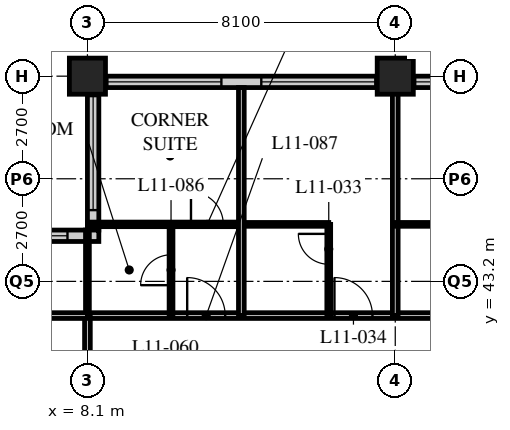
"""IFC4 building model, lengths in metres.
Left out: names, types, materials, properties, quantities, classifications, styles, units other than length and angle.
Written with IfcOpenShell. Run it as: python <this file> out.ifc"""

import sys

from ifc_helpers import new_model, si_unit, direction, frame, frame_2d, origin, origin_2d, place, context, subcontext, project, spatial, rectangle, hollow_rectangle, extrude, element, fill, save


model = new_model("IFC4")
c1 = context("Model", 3, precision=1e-05, world=origin(), true_north=direction((0.0, 1.0)))
c2 = subcontext(c1, "Body", "Model", "MODEL_VIEW")
j1 = project(units=[si_unit("LENGTHUNIT", "METRE"), si_unit("PLANEANGLEUNIT", "RADIAN")], contexts=[c1])
p1 = place(None, origin())
s1 = spatial("IfcSite", under=j1, at=p1, CompositionType="ELEMENT")
p2 = place(p1, origin())
s2 = spatial("IfcBuilding", under=s1, at=p2, CompositionType="ELEMENT")
p3 = place(p2, frame((0.0, 0.0, 50.0)))
s3 = spatial("IfcBuildingStorey", under=s2, at=p3, CompositionType="ELEMENT", Elevation=50.0)
for number, where, z_axis, x_axis in (
    (1, (8.1, 48.6, 0.0), (0.0, 0.0, 1.0), (1.0, 0.0, 0.0)),
    (2, (16.2, 48.6, 0.0), (0.0, 0.0, 1.0), (1.0, 0.0, 0.0)),
):
    element("IfcColumn", number, at=place(p3, frame(where, z_axis=z_axis, x_axis=x_axis)), inside=s3, PredefinedType="COLUMN", context=c2, shape_type="SweptSolid", body=[
        extrude(hollow_rectangle(XDim=0.95, YDim=0.95, WallThickness=0.095, at=origin_2d()), origin(), (0.0, 0.0, 1.0), 3.4),
    ])
p4 = place(p3, frame((48.3, 48.45, 0.0), z_axis=(0.0, 0.0, 1.0), x_axis=(-1.0, 0.0, 0.0)))
e3 = element("IfcWall", 3, at=p4, inside=s3, PredefinedType="SOLIDWALL", context=c2, shape_type="SweptSolid", body=[
    extrude(rectangle(XDim=40.2, YDim=0.3, at=frame_2d((20.1, 0.0))), origin(), (0.0, 0.0, 1.0), 3.19),
])
p5 = place(p4, frame((0.225, 0.0, 0.9)))
e4 = element("IfcOpeningElement", 4, at=p5, cuts=e3, PredefinedType="OPENING", context=c2, shape_type="SweptSolid", body=[
    extrude(rectangle(XDim=3.0, YDim=2.0, at=frame_2d((1.5, 1.0))), frame((0.0, 0.16, 0.0), z_axis=(0.0, -1.0, 0.0), x_axis=(1.0, 0.0, 0.0)), (0.0, 0.0, 1.0), 0.32),
])
p6 = place(p4, frame((4.275, 0.0, 0.9)))
e5 = element("IfcOpeningElement", 5, at=p6, cuts=e3, PredefinedType="OPENING", context=c2, shape_type="SweptSolid", body=[
    extrude(rectangle(XDim=3.0, YDim=2.0, at=frame_2d((1.5, 1.0))), frame((0.0, 0.16, 0.0), z_axis=(0.0, -1.0, 0.0), x_axis=(1.0, 0.0, 0.0)), (0.0, 0.0, 1.0), 0.32),
])
p7 = place(p4, frame((8.325, 0.0, 0.9)))
e6 = element("IfcOpeningElement", 6, at=p7, cuts=e3, PredefinedType="OPENING", context=c2, shape_type="SweptSolid", body=[
    extrude(rectangle(XDim=3.0, YDim=2.0, at=frame_2d((1.5, 1.0))), frame((0.0, 0.16, 0.0), z_axis=(0.0, -1.0, 0.0), x_axis=(1.0, 0.0, 0.0)), (0.0, 0.0, 1.0), 0.32),
])
p8 = place(p4, frame((12.375, 0.0, 0.9)))
e7 = element("IfcOpeningElement", 7, at=p8, cuts=e3, PredefinedType="OPENING", context=c2, shape_type="SweptSolid", body=[
    extrude(rectangle(XDim=3.0, YDim=2.0, at=frame_2d((1.5, 1.0))), frame((0.0, 0.16, 0.0), z_axis=(0.0, -1.0, 0.0), x_axis=(1.0, 0.0, 0.0)), (0.0, 0.0, 1.0), 0.32),
])
p9 = place(p4, frame((16.425, 0.0, 0.9)))
e8 = element("IfcOpeningElement", 8, at=p9, cuts=e3, PredefinedType="OPENING", context=c2, shape_type="SweptSolid", body=[
    extrude(rectangle(XDim=3.0, YDim=2.0, at=frame_2d((1.5, 1.0))), frame((0.0, 0.16, 0.0), z_axis=(0.0, -1.0, 0.0), x_axis=(1.0, 0.0, 0.0)), (0.0, 0.0, 1.0), 0.32),
])
p10 = place(p4, frame((20.475, 0.0, 0.9)))
e9 = element("IfcOpeningElement", 9, at=p10, cuts=e3, PredefinedType="OPENING", context=c2, shape_type="SweptSolid", body=[
    extrude(rectangle(XDim=3.0, YDim=2.0, at=frame_2d((1.5, 1.0))), frame((0.0, 0.16, 0.0), z_axis=(0.0, -1.0, 0.0), x_axis=(1.0, 0.0, 0.0)), (0.0, 0.0, 1.0), 0.32),
])
p11 = place(p4, frame((24.525, 0.0, 0.9)))
e10 = element("IfcOpeningElement", 10, at=p11, cuts=e3, PredefinedType="OPENING", context=c2, shape_type="SweptSolid", body=[
    extrude(rectangle(XDim=3.0, YDim=2.0, at=frame_2d((1.5, 1.0))), frame((0.0, 0.16, 0.0), z_axis=(0.0, -1.0, 0.0), x_axis=(1.0, 0.0, 0.0)), (0.0, 0.0, 1.0), 0.32),
])
p12 = place(p4, frame((28.575, 0.0, 0.9)))
e11 = element("IfcOpeningElement", 11, at=p12, cuts=e3, PredefinedType="OPENING", context=c2, shape_type="SweptSolid", body=[
    extrude(rectangle(XDim=3.0, YDim=2.0, at=frame_2d((1.5, 1.0))), frame((0.0, 0.16, 0.0), z_axis=(0.0, -1.0, 0.0), x_axis=(1.0, 0.0, 0.0)), (0.0, 0.0, 1.0), 0.32),
])
p13 = place(p4, frame((32.625, 0.0, 0.9)))
e12 = element("IfcOpeningElement", 12, at=p13, cuts=e3, PredefinedType="OPENING", context=c2, shape_type="SweptSolid", body=[
    extrude(rectangle(XDim=3.0, YDim=2.0, at=frame_2d((1.5, 1.0))), frame((0.0, 0.16, 0.0), z_axis=(0.0, -1.0, 0.0), x_axis=(1.0, 0.0, 0.0)), (0.0, 0.0, 1.0), 0.32),
])
p14 = place(p4, frame((36.675, 0.0, 0.9)))
e13 = element("IfcOpeningElement", 13, at=p14, cuts=e3, PredefinedType="OPENING", context=c2, shape_type="SweptSolid", body=[
    extrude(rectangle(XDim=3.0, YDim=2.0, at=frame_2d((1.5, 1.0))), frame((0.0, 0.16, 0.0), z_axis=(0.0, -1.0, 0.0), x_axis=(1.0, 0.0, 0.0)), (0.0, 0.0, 1.0), 0.32),
])
p15 = place(p3, frame((8.25, 48.3, 0.0), z_axis=(0.0, 0.0, 1.0), x_axis=(0.0, -1.0, 0.0)))
e14 = element("IfcWall", 14, at=p15, inside=s3, PredefinedType="SOLIDWALL", context=c2, shape_type="SweptSolid", body=[
    extrude(rectangle(XDim=3.75, YDim=0.3, at=frame_2d((1.875, 0.0))), origin(), (0.0, 0.0, 1.0), 3.19),
])
p16 = place(p15, frame((0.225, 0.0, 0.9)))
e15 = element("IfcOpeningElement", 15, at=p16, cuts=e14, PredefinedType="OPENING", context=c2, shape_type="SweptSolid", body=[
    extrude(rectangle(XDim=3.0, YDim=1.5, at=frame_2d((1.5, 0.75))), frame((0.0, 0.16, 0.0), z_axis=(0.0, -1.0, 0.0), x_axis=(1.0, 0.0, 0.0)), (0.0, 0.0, 1.0), 0.32),
])
p17 = place(p3, frame((8.4, 44.4, 0.0), z_axis=(0.0, 0.0, 1.0), x_axis=(-1.0, 0.0, 0.0)))
e16 = element("IfcWall", 16, at=p17, inside=s3, PredefinedType="SOLIDWALL", context=c2, shape_type="SweptSolid", body=[
    extrude(rectangle(XDim=4.35, YDim=0.3, at=frame_2d((2.175, 0.0))), origin(), (0.0, 0.0, 1.0), 3.19),
])
p18 = place(p17, frame((0.825, 0.0, 0.9)))
e17 = element("IfcOpeningElement", 17, at=p18, cuts=e16, PredefinedType="OPENING", context=c2, shape_type="SweptSolid", body=[
    extrude(rectangle(XDim=3.0, YDim=1.5, at=frame_2d((1.5, 0.75))), frame((0.0, 0.16, 0.0), z_axis=(0.0, -1.0, 0.0), x_axis=(1.0, 0.0, 0.0)), (0.0, 0.0, 1.0), 0.32),
])
p19 = place(p3, frame((8.1, 42.3, 0.0), z_axis=(0.0, 0.0, 1.0), x_axis=(1.0, 0.0, 0.0)))
e18 = element("IfcWall", 18, at=p19, inside=s3, PredefinedType="PARTITIONING", context=c2, shape_type="SweptSolid", body=[
    extrude(rectangle(XDim=40.5, YDim=0.15, at=frame_2d((20.25, 0.0))), origin(), (0.0, 0.0, 1.0), 3.19),
])
p20 = place(p19, frame((6.5, 0.0, 0.0)))
e19 = element("IfcOpeningElement", 19, at=p20, cuts=e18, PredefinedType="OPENING", context=c2, shape_type="SweptSolid", body=[
    extrude(rectangle(XDim=1.0, YDim=2.1, at=frame_2d((0.5, 1.05))), frame((0.0, 0.085, 0.0), z_axis=(0.0, -1.0, 0.0), x_axis=(1.0, 0.0, 0.0)), (0.0, 0.0, 1.0), 0.17),
])
p21 = place(p19, frame((10.55, 0.0, 0.0)))
e20 = element("IfcOpeningElement", 20, at=p21, cuts=e18, PredefinedType="OPENING", context=c2, shape_type="SweptSolid", body=[
    extrude(rectangle(XDim=1.0, YDim=2.1, at=frame_2d((0.5, 1.05))), frame((0.0, 0.085, 0.0), z_axis=(0.0, -1.0, 0.0), x_axis=(1.0, 0.0, 0.0)), (0.0, 0.0, 1.0), 0.17),
])
p22 = place(p19, frame((14.6, 0.0, 0.0)))
e21 = element("IfcOpeningElement", 21, at=p22, cuts=e18, PredefinedType="OPENING", context=c2, shape_type="SweptSolid", body=[
    extrude(rectangle(XDim=1.0, YDim=2.1, at=frame_2d((0.5, 1.05))), frame((0.0, 0.085, 0.0), z_axis=(0.0, -1.0, 0.0), x_axis=(1.0, 0.0, 0.0)), (0.0, 0.0, 1.0), 0.17),
])
p23 = place(p19, frame((18.65, 0.0, 0.0)))
e22 = element("IfcOpeningElement", 22, at=p23, cuts=e18, PredefinedType="OPENING", context=c2, shape_type="SweptSolid", body=[
    extrude(rectangle(XDim=1.0, YDim=2.1, at=frame_2d((0.5, 1.05))), frame((0.0, 0.085, 0.0), z_axis=(0.0, -1.0, 0.0), x_axis=(1.0, 0.0, 0.0)), (0.0, 0.0, 1.0), 0.17),
])
p24 = place(p19, frame((22.7, 0.0, 0.0)))
e23 = element("IfcOpeningElement", 23, at=p24, cuts=e18, PredefinedType="OPENING", context=c2, shape_type="SweptSolid", body=[
    extrude(rectangle(XDim=1.0, YDim=2.1, at=frame_2d((0.5, 1.05))), frame((0.0, 0.085, 0.0), z_axis=(0.0, -1.0, 0.0), x_axis=(1.0, 0.0, 0.0)), (0.0, 0.0, 1.0), 0.17),
])
p25 = place(p19, frame((26.75, 0.0, 0.0)))
e24 = element("IfcOpeningElement", 24, at=p25, cuts=e18, PredefinedType="OPENING", context=c2, shape_type="SweptSolid", body=[
    extrude(rectangle(XDim=1.0, YDim=2.1, at=frame_2d((0.5, 1.05))), frame((0.0, 0.085, 0.0), z_axis=(0.0, -1.0, 0.0), x_axis=(1.0, 0.0, 0.0)), (0.0, 0.0, 1.0), 0.17),
])
p26 = place(p19, frame((30.8, 0.0, 0.0)))
e25 = element("IfcOpeningElement", 25, at=p26, cuts=e18, PredefinedType="OPENING", context=c2, shape_type="SweptSolid", body=[
    extrude(rectangle(XDim=1.0, YDim=2.1, at=frame_2d((0.5, 1.05))), frame((0.0, 0.085, 0.0), z_axis=(0.0, -1.0, 0.0), x_axis=(1.0, 0.0, 0.0)), (0.0, 0.0, 1.0), 0.17),
])
p27 = place(p19, frame((34.85, 0.0, 0.0)))
e26 = element("IfcOpeningElement", 26, at=p27, cuts=e18, PredefinedType="OPENING", context=c2, shape_type="SweptSolid", body=[
    extrude(rectangle(XDim=1.0, YDim=2.1, at=frame_2d((0.5, 1.05))), frame((0.0, 0.085, 0.0), z_axis=(0.0, -1.0, 0.0), x_axis=(1.0, 0.0, 0.0)), (0.0, 0.0, 1.0), 0.17),
])
p28 = place(p19, frame((36.875, 0.0, 0.0)))
e27 = element("IfcOpeningElement", 27, at=p28, cuts=e18, PredefinedType="OPENING", context=c2, shape_type="SweptSolid", body=[
    extrude(rectangle(XDim=1.0, YDim=2.1, at=frame_2d((0.5, 1.05))), frame((0.0, 0.085, 0.0), z_axis=(0.0, -1.0, 0.0), x_axis=(1.0, 0.0, 0.0)), (0.0, 0.0, 1.0), 0.17),
])
p29 = place(p19, frame((2.625, 0.0, 0.0)))
e28 = element("IfcOpeningElement", 28, at=p29, cuts=e18, PredefinedType="OPENING", context=c2, shape_type="SweptSolid", body=[
    extrude(rectangle(XDim=1.0, YDim=2.1, at=frame_2d((0.5, 1.05))), frame((0.0, 0.085, 0.0), z_axis=(0.0, -1.0, 0.0), x_axis=(1.0, 0.0, 0.0)), (0.0, 0.0, 1.0), 0.17),
])
p30 = place(p3, frame((8.1, 16.2, 0.0), z_axis=(0.0, 0.0, 1.0), x_axis=(0.0, 1.0, 0.0)))
e29 = element("IfcWall", 29, at=p30, inside=s3, PredefinedType="PARTITIONING", context=c2, shape_type="SweptSolid", body=[
    extrude(rectangle(XDim=26.1, YDim=0.15, at=frame_2d((13.05, 0.0))), origin(), (0.0, 0.0, 1.0), 2.578),
])
p31 = place(p30, frame((2.75, 0.0, 0.0)))
e30 = element("IfcOpeningElement", 30, at=p31, cuts=e29, PredefinedType="OPENING", context=c2, shape_type="SweptSolid", body=[
    extrude(rectangle(XDim=1.0, YDim=2.1, at=frame_2d((0.5, 1.05))), frame((0.0, 0.085, 0.0), z_axis=(0.0, -1.0, 0.0), x_axis=(1.0, 0.0, 0.0)), (0.0, 0.0, 1.0), 0.17),
])
p32 = place(p30, frame((4.35, 0.0, 0.0)))
e31 = element("IfcOpeningElement", 31, at=p32, cuts=e29, PredefinedType="OPENING", context=c2, shape_type="SweptSolid", body=[
    extrude(rectangle(XDim=1.0, YDim=2.1, at=frame_2d((0.5, 1.05))), frame((0.0, 0.085, 0.0), z_axis=(0.0, -1.0, 0.0), x_axis=(1.0, 0.0, 0.0)), (0.0, 0.0, 1.0), 0.17),
])
p33 = place(p30, frame((10.85, 0.0, 0.0)))
e32 = element("IfcOpeningElement", 32, at=p33, cuts=e29, PredefinedType="OPENING", context=c2, shape_type="SweptSolid", body=[
    extrude(rectangle(XDim=1.0, YDim=2.1, at=frame_2d((0.5, 1.05))), frame((0.0, 0.085, 0.0), z_axis=(0.0, -1.0, 0.0), x_axis=(1.0, 0.0, 0.0)), (0.0, 0.0, 1.0), 0.17),
])
p34 = place(p30, frame((12.45, 0.0, 0.0)))
e33 = element("IfcOpeningElement", 33, at=p34, cuts=e29, PredefinedType="OPENING", context=c2, shape_type="SweptSolid", body=[
    extrude(rectangle(XDim=1.0, YDim=2.1, at=frame_2d((0.5, 1.05))), frame((0.0, 0.085, 0.0), z_axis=(0.0, -1.0, 0.0), x_axis=(1.0, 0.0, 0.0)), (0.0, 0.0, 1.0), 0.17),
])
p35 = place(p30, frame((18.65, 0.0, 0.0)))
e34 = element("IfcOpeningElement", 34, at=p35, cuts=e29, PredefinedType="OPENING", context=c2, shape_type="SweptSolid", body=[
    extrude(rectangle(XDim=1.0, YDim=2.1, at=frame_2d((0.5, 1.05))), frame((0.0, 0.085, 0.0), z_axis=(0.0, -1.0, 0.0), x_axis=(1.0, 0.0, 0.0)), (0.0, 0.0, 1.0), 0.17),
])
p36 = place(p30, frame((22.7, 0.0, 0.0)))
e35 = element("IfcOpeningElement", 35, at=p36, cuts=e29, PredefinedType="OPENING", context=c2, shape_type="SweptSolid", body=[
    extrude(rectangle(XDim=1.0, YDim=2.1, at=frame_2d((0.5, 1.05))), frame((0.0, 0.085, 0.0), z_axis=(0.0, -1.0, 0.0), x_axis=(1.0, 0.0, 0.0)), (0.0, 0.0, 1.0), 0.17),
])
p37 = place(p3, frame((12.15, 44.7, 0.0), z_axis=(0.0, 0.0, 1.0), x_axis=(1.0, 0.0, 0.0)))
e36 = element("IfcWall", 36, at=p37, inside=s3, PredefinedType="PARTITIONING", context=c2, shape_type="SweptSolid", body=[
    extrude(rectangle(XDim=2.3, YDim=0.1, at=frame_2d((1.15, 0.0))), origin(), (0.0, 0.0, 1.0), 3.19),
])
p38 = place(p3, frame((14.45, 42.3, 0.0), z_axis=(0.0, 0.0, 1.0), x_axis=(0.0, 1.0, 0.0)))
e37 = element("IfcWall", 37, at=p38, inside=s3, PredefinedType="PARTITIONING", context=c2, shape_type="SweptSolid", body=[
    extrude(rectangle(XDim=2.4, YDim=0.1, at=frame_2d((1.2, 0.0))), origin(), (0.0, 0.0, 1.0), 3.19),
])
p39 = place(p38, frame((1.35, 0.0, 0.0)))
e38 = element("IfcOpeningElement", 38, at=p39, cuts=e37, PredefinedType="OPENING", context=c2, shape_type="SweptSolid", body=[
    extrude(rectangle(XDim=0.8, YDim=2.1, at=frame_2d((0.4, 1.05))), frame((0.0, 0.06, 0.0), z_axis=(0.0, -1.0, 0.0), x_axis=(1.0, 0.0, 0.0)), (0.0, 0.0, 1.0), 0.12),
])
p40 = place(p3, frame((16.2, 42.3, 0.0), z_axis=(0.0, 0.0, 1.0), x_axis=(0.0, 1.0, 0.0)))
e39 = element("IfcWall", 39, at=p40, inside=s3, PredefinedType="PARTITIONING", context=c2, shape_type="SweptSolid", body=[
    extrude(rectangle(XDim=6.0, YDim=0.15, at=frame_2d((3.0, 0.0))), origin(), (0.0, 0.0, 1.0), 2.578),
])
p41 = place(p3, frame((16.2, 44.7, 0.0), z_axis=(0.0, 0.0, 1.0), x_axis=(1.0, 0.0, 0.0)))
e40 = element("IfcWall", 40, at=p41, inside=s3, PredefinedType="PARTITIONING", context=c2, shape_type="SweptSolid", body=[
    extrude(rectangle(XDim=2.3, YDim=0.1, at=frame_2d((1.15, 0.0))), origin(), (0.0, 0.0, 1.0), 3.19),
])
p42 = place(p3, frame((8.1, 44.7, 0.0), z_axis=(0.0, 0.0, 1.0), x_axis=(1.0, 0.0, 0.0)))
e41 = element("IfcWall", 41, at=p42, inside=s3, PredefinedType="PARTITIONING", context=c2, shape_type="SweptSolid", body=[
    extrude(rectangle(XDim=4.05, YDim=0.12, at=frame_2d((2.025, 0.0))), origin(), (0.0, 0.0, 1.0), 3.19),
])
p43 = place(p42, frame((2.725, 0.0, 0.0)))
e42 = element("IfcOpeningElement", 42, at=p43, cuts=e41, PredefinedType="OPENING", context=c2, shape_type="SweptSolid", body=[
    extrude(rectangle(XDim=0.85, YDim=2.1, at=frame_2d((0.425, 1.05))), frame((0.0, 0.07, 0.0), z_axis=(0.0, -1.0, 0.0), x_axis=(1.0, 0.0, 0.0)), (0.0, 0.0, 1.0), 0.14),
])
p44 = place(p3, frame((10.3, 42.3, 0.0), z_axis=(0.0, 0.0, 1.0), x_axis=(0.0, 1.0, 0.0)))
e43 = element("IfcWall", 43, at=p44, inside=s3, PredefinedType="PARTITIONING", context=c2, shape_type="SweptSolid", body=[
    extrude(rectangle(XDim=2.4, YDim=0.1, at=frame_2d((1.2, 0.0))), origin(), (0.0, 0.0, 1.0), 3.19),
])
p45 = place(p44, frame((0.8, 0.0, 0.0)))
e44 = element("IfcOpeningElement", 44, at=p45, cuts=e43, PredefinedType="OPENING", context=c2, shape_type="SweptSolid", body=[
    extrude(rectangle(XDim=0.8, YDim=2.1, at=frame_2d((0.4, 1.05))), frame((0.0, 0.06, 0.0), z_axis=(0.0, -1.0, 0.0), x_axis=(1.0, 0.0, 0.0)), (0.0, 0.0, 1.0), 0.12),
])
p46 = place(p3, frame((8.1, 42.3, 0.0), z_axis=(0.0, 0.0, 1.0), x_axis=(0.0, 1.0, 0.0)))
e45 = element("IfcWall", 45, at=p46, inside=s3, PredefinedType="PARTITIONING", context=c2, shape_type="SweptSolid", body=[
    extrude(rectangle(XDim=2.25, YDim=0.1, at=frame_2d((1.125, 0.0))), origin(), (0.0, 0.0, 1.0), 2.578),
])
p47 = place(p3, frame((4.35, 42.3, 0.0), z_axis=(0.0, 0.0, 1.0), x_axis=(1.0, 0.0, 0.0)))
e46 = element("IfcWall", 46, at=p47, inside=s3, PredefinedType="PARTITIONING", context=c2, shape_type="SweptSolid", body=[
    extrude(rectangle(XDim=3.75, YDim=0.15, at=frame_2d((1.875, 0.0))), origin(), (0.0, 0.0, 1.0), 3.19),
])
p48 = place(p3, frame((12.15, 42.3, 0.0), z_axis=(0.0, 0.0, 1.0), x_axis=(0.0, 1.0, 0.0)))
e47 = element("IfcWall", 47, at=p48, inside=s3, PredefinedType="PARTITIONING", context=c2, shape_type="SweptSolid", body=[
    extrude(rectangle(XDim=6.0, YDim=0.15, at=frame_2d((3.0, 0.0))), origin(), (0.0, 0.0, 1.0), 3.19),
])
p49 = place(p12, origin())
e48 = element("IfcWindow", 48, at=p49, inside=s3, PartitioningType="SINGLE_PANEL", PredefinedType="WINDOW", context=c2, shape_type="SweptSolid", body=[
    extrude(rectangle(XDim=3.0, YDim=2.0, at=frame_2d((1.5, 1.0))), frame((0.0, 0.03, 0.0), z_axis=(0.0, -1.0, 0.0), x_axis=(1.0, 0.0, 0.0)), (0.0, 0.0, 1.0), 0.06),
])
fill(e11, e48)
p50 = place(p13, origin())
e49 = element("IfcWindow", 49, at=p50, inside=s3, PartitioningType="SINGLE_PANEL", PredefinedType="WINDOW", context=c2, shape_type="SweptSolid", body=[
    extrude(rectangle(XDim=3.0, YDim=2.0, at=frame_2d((1.5, 1.0))), frame((0.0, 0.03, 0.0), z_axis=(0.0, -1.0, 0.0), x_axis=(1.0, 0.0, 0.0)), (0.0, 0.0, 1.0), 0.06),
])
fill(e12, e49)
p51 = place(p14, origin())
e50 = element("IfcWindow", 50, at=p51, inside=s3, PartitioningType="SINGLE_PANEL", PredefinedType="WINDOW", context=c2, shape_type="SweptSolid", body=[
    extrude(rectangle(XDim=3.0, YDim=2.0, at=frame_2d((1.5, 1.0))), frame((0.0, 0.03, 0.0), z_axis=(0.0, -1.0, 0.0), x_axis=(1.0, 0.0, 0.0)), (0.0, 0.0, 1.0), 0.06),
])
fill(e13, e50)
p52 = place(p16, origin())
e51 = element("IfcWindow", 51, at=p52, inside=s3, PartitioningType="SINGLE_PANEL", PredefinedType="WINDOW", context=c2, shape_type="SweptSolid", body=[
    extrude(rectangle(XDim=3.0, YDim=1.5, at=frame_2d((1.5, 0.75))), frame((0.0, 0.03, 0.0), z_axis=(0.0, -1.0, 0.0), x_axis=(1.0, 0.0, 0.0)), (0.0, 0.0, 1.0), 0.06),
])
fill(e15, e51)
p53 = place(p18, origin())
e52 = element("IfcWindow", 52, at=p53, inside=s3, PartitioningType="SINGLE_PANEL", PredefinedType="WINDOW", context=c2, shape_type="SweptSolid", body=[
    extrude(rectangle(XDim=3.0, YDim=1.5, at=frame_2d((1.5, 0.75))), frame((0.0, 0.03, 0.0), z_axis=(0.0, -1.0, 0.0), x_axis=(1.0, 0.0, 0.0)), (0.0, 0.0, 1.0), 0.06),
])
fill(e17, e52)
p54 = place(p39, origin())
e53 = element("IfcDoor", 53, at=p54, inside=s3, OperationType="SINGLE_SWING_RIGHT", PredefinedType="DOOR", context=c2, shape_type="SweptSolid", body=[
    extrude(rectangle(XDim=0.8, YDim=2.1, at=frame_2d((0.4, 1.05))), frame((0.0, 0.025, 0.0), z_axis=(0.0, -1.0, 0.0), x_axis=(1.0, 0.0, 0.0)), (0.0, 0.0, 1.0), 0.05),
])
fill(e38, e53)
p55 = place(p20, origin())
e54 = element("IfcDoor", 54, at=p55, inside=s3, OperationType="SINGLE_SWING_LEFT", PredefinedType="DOOR", context=c2, shape_type="SweptSolid", body=[
    extrude(rectangle(XDim=1.0, YDim=2.1, at=frame_2d((0.5, 1.05))), frame((0.0, 0.025, 0.0), z_axis=(0.0, -1.0, 0.0), x_axis=(1.0, 0.0, 0.0)), (0.0, 0.0, 1.0), 0.05),
])
fill(e19, e54)
p56 = place(p45, origin())
e55 = element("IfcDoor", 55, at=p56, inside=s3, OperationType="SINGLE_SWING_LEFT", PredefinedType="DOOR", context=c2, shape_type="SweptSolid", body=[
    extrude(rectangle(XDim=0.8, YDim=2.1, at=frame_2d((0.4, 1.05))), frame((0.0, 0.025, 0.0), z_axis=(0.0, -1.0, 0.0), x_axis=(1.0, 0.0, 0.0)), (0.0, 0.0, 1.0), 0.05),
])
fill(e44, e55)
p57 = place(p29, origin())
e56 = element("IfcDoor", 56, at=p57, inside=s3, OperationType="SINGLE_SWING_LEFT", PredefinedType="DOOR", context=c2, shape_type="SweptSolid", body=[
    extrude(rectangle(XDim=1.0, YDim=2.1, at=frame_2d((0.5, 1.05))), frame((0.0, 0.025, 0.0), z_axis=(0.0, -1.0, 0.0), x_axis=(1.0, 0.0, 0.0)), (0.0, 0.0, 1.0), 0.05),
])
fill(e28, e56)
p58 = place(p43, origin())
e57 = element("IfcDoor", 57, at=p58, inside=s3, OperationType="SINGLE_SWING_LEFT", PredefinedType="DOOR", context=c2, shape_type="SweptSolid", body=[
    extrude(rectangle(XDim=0.85, YDim=2.1, at=frame_2d((0.425, 1.05))), frame((0.0, 0.025, 0.0), z_axis=(0.0, -1.0, 0.0), x_axis=(1.0, 0.0, 0.0)), (0.0, 0.0, 1.0), 0.05),
])
fill(e42, e57)
save(model, sys.argv[1])
